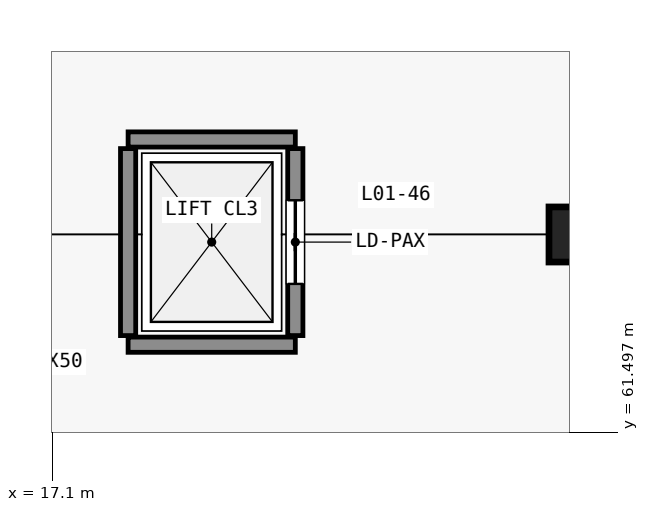
"""IFC4 building model, lengths in metres.
Left out: names, types, materials, properties, quantities, classifications, styles, units other than length and angle.
Written with IfcOpenShell. Run it as: python <this file> out.ifc"""

import sys

from ifc_helpers import new_model, si_unit, direction, frame, frame_2d, origin, origin_2d, place, context, subcontext, project, spatial, rectangle, extrude, element, fill, save


model = new_model("IFC4")
c1 = context("Model", 3, precision=1e-05, world=origin(), true_north=direction((0.0, 1.0)))
c2 = subcontext(c1, "Body", "Model", "MODEL_VIEW")
j1 = project(units=[si_unit("LENGTHUNIT", "METRE"), si_unit("PLANEANGLEUNIT", "RADIAN")], contexts=[c1])
p1 = place(None, origin())
s1 = spatial("IfcSite", under=j1, at=p1, CompositionType="ELEMENT")
p2 = place(p1, origin())
s2 = spatial("IfcBuilding", under=s1, at=p2, CompositionType="ELEMENT")
p3 = place(p2, frame((0.0, 0.0, 6.0)))
s3 = spatial("IfcBuildingStorey", under=s2, at=p3, CompositionType="ELEMENT", Elevation=6.0)
p4 = place(p3, frame((24.0, 64.1, 0.0), z_axis=(0.0, 0.0, 1.0), x_axis=(1.0, 0.0, 0.0)))
e1 = element("IfcColumn", 1, at=p4, inside=s3, PredefinedType="COLUMN", context=c2, shape_type="SweptSolid", body=[
    extrude(rectangle(XDim=0.75, YDim=0.75, at=origin_2d()), origin(), (0.0, 0.0, 1.0), 2.55),
])
p5 = place(p3, frame((24.0, 64.1, 2.55), z_axis=(0.0, 0.0, 1.0), x_axis=(1.0, 0.0, 0.0)))
e2 = element("IfcColumn", 2, at=p5, inside=s3, PredefinedType="COLUMN", context=c2, shape_type="SweptSolid", body=[
    extrude(rectangle(XDim=0.7, YDim=0.7, at=origin_2d()), origin(), (0.0, 0.0, 1.0), 2.85),
])
for number, where, z_axis, x_axis in (
    (3, (18.1, 62.65, 0.0), (0.0, 0.0, 1.0), (1.0, 0.0, 0.0)),
    (4, (18.1, 65.35, 0.0), (0.0, 0.0, 1.0), (1.0, 0.0, 0.0)),
):
    element("IfcWall", number, at=place(p3, frame(where, z_axis=z_axis, x_axis=x_axis)), inside=s3, PredefinedType="STANDARD", context=c2, shape_type="SweptSolid", body=[
        extrude(rectangle(XDim=2.2, YDim=0.2, at=frame_2d((1.1, 0.0))), origin(), (0.0, 0.0, 1.0), 5.04),
    ])
p6 = place(p3, frame((18.1, 62.77, 0.0), z_axis=(0.0, 0.0, 1.0), x_axis=(0.0, 1.0, 0.0)))
e5 = element("IfcWall", 5, at=p6, inside=s3, PredefinedType="STANDARD", context=c2, shape_type="SweptSolid", body=[
    extrude(rectangle(XDim=2.46, YDim=0.2, at=frame_2d((1.23, 0.0))), origin(), (0.0, 0.0, 1.0), 5.04),
])
p7 = place(p3, frame((20.3, 62.77, 0.0), z_axis=(0.0, 0.0, 1.0), x_axis=(0.0, 1.0, 0.0)))
e6 = element("IfcWall", 6, at=p7, inside=s3, PredefinedType="STANDARD", context=c2, shape_type="SweptSolid", body=[
    extrude(rectangle(XDim=2.46, YDim=0.2, at=frame_2d((1.23, 0.0))), origin(), (0.0, 0.0, 1.0), 5.04),
])
p8 = place(p7, frame((0.68, 0.0, 0.0)))
e7 = element("IfcOpeningElement", 7, at=p8, cuts=e6, PredefinedType="OPENING", context=c2, shape_type="SweptSolid", body=[
    extrude(rectangle(XDim=1.1, YDim=2.15, at=frame_2d((0.55, 1.075))), frame((0.0, 0.11, 0.0), z_axis=(0.0, -1.0, 0.0), x_axis=(1.0, 0.0, 0.0)), (0.0, 0.0, 1.0), 0.22),
])
p9 = place(p8, origin())
e8 = element("IfcDoor", 8, at=p9, inside=s3, OperationType="SLIDING_TO_LEFT", PredefinedType="DOOR", context=c2, shape_type="SweptSolid", body=[
    extrude(rectangle(XDim=1.1, YDim=2.15, at=frame_2d((0.55, 1.075))), frame((0.0, 0.025, 0.0), z_axis=(0.0, -1.0, 0.0), x_axis=(1.0, 0.0, 0.0)), (0.0, 0.0, 1.0), 0.05),
])
fill(e7, e8)
save(model, sys.argv[1])
